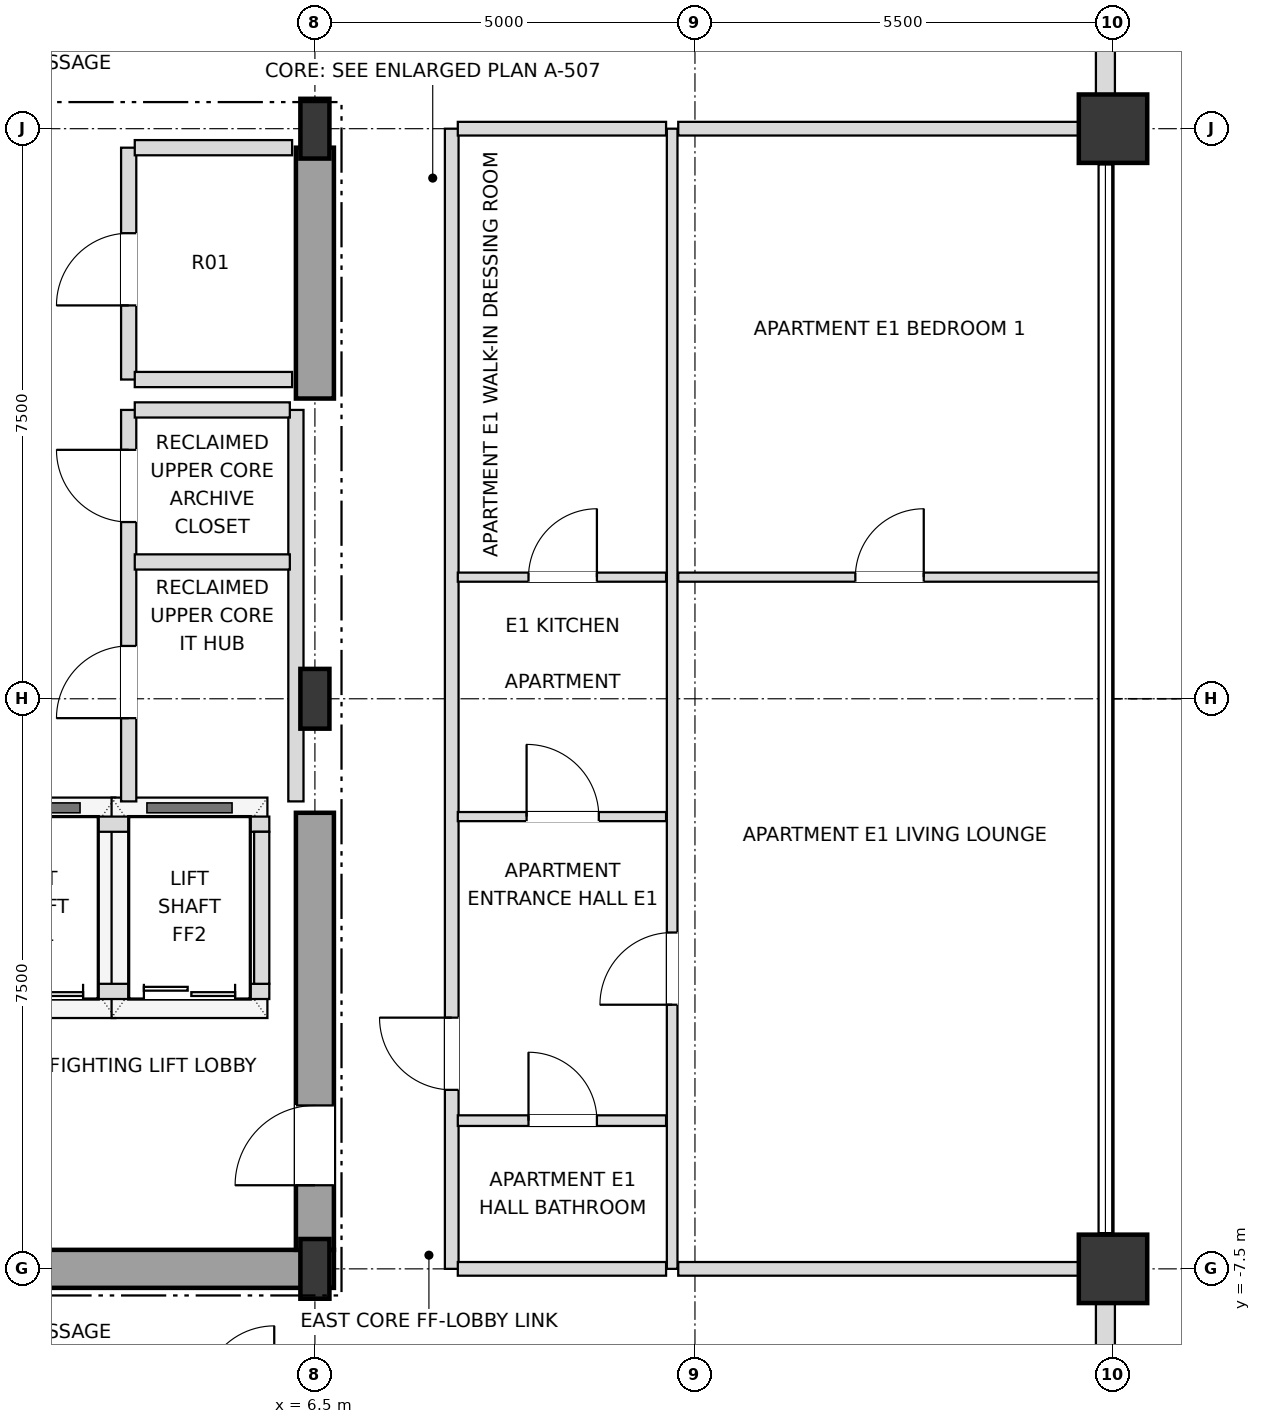
"""IFC4 building model, lengths in metres.
Left out: names, types, materials, properties, quantities, classifications, styles, units other than length and angle.
Written with IfcOpenShell. Run it as: python <this file> out.ifc"""

import sys

from ifc_helpers import new_model, si_unit, direction, frame, frame_2d, origin, origin_2d, place, context, subcontext, project, spatial, rectangle, i_section, extrude, element, fill, save


model = new_model("IFC4")
c1 = context("Model", 3, precision=1e-05, world=origin(), true_north=direction((0.0, 1.0)))
c2 = subcontext(c1, "Body", "Model", "MODEL_VIEW")
j1 = project(units=[si_unit("LENGTHUNIT", "METRE"), si_unit("PLANEANGLEUNIT", "RADIAN")], contexts=[c1])
p1 = place(None, origin())
s1 = spatial("IfcSite", under=j1, at=p1, CompositionType="ELEMENT")
p2 = place(p1, origin())
s2 = spatial("IfcBuilding", under=s1, at=p2, CompositionType="ELEMENT")
p3 = place(p2, frame((0.0, 0.0, 229.5)))
s3 = spatial("IfcBuildingStorey", under=s2, at=p3, CompositionType="ELEMENT", Elevation=229.5)
for number, where, z_axis, x_axis in (
    (1, (6.5, -7.5, 0.0), (0.0, 0.0, 1.0), (1.0, 0.0, 0.0)),
    (2, (6.5, 0.0, 0.0), (0.0, 0.0, 1.0), (1.0, 0.0, 0.0)),
    (3, (6.5, 7.5, 0.0), (0.0, 0.0, 1.0), (1.0, 0.0, 0.0)),
):
    element("IfcColumn", number, at=place(p3, frame(where, z_axis=z_axis, x_axis=x_axis)), inside=s3, PredefinedType="COLUMN", context=c2, shape_type="SweptSolid", body=[
        extrude(i_section(OverallWidth=0.382, OverallDepth=0.786, WebThickness=0.02, FlangeThickness=0.033, at=origin_2d()), origin(), (0.0, 0.0, 1.0), 3.6),
    ])
for number, where, z_axis, x_axis in (
    (4, (17.0, -7.5, 0.0), (0.0, 0.0, 1.0), (1.0, 0.0, 0.0)),
    (5, (17.0, 7.5, 0.0), (0.0, 0.0, 1.0), (1.0, 0.0, 0.0)),
):
    element("IfcColumn", number, at=place(p3, frame(where, z_axis=z_axis, x_axis=x_axis)), inside=s3, PredefinedType="USERDEFINED", context=c2, shape_type="SweptSolid", body=[
        extrude(rectangle(XDim=0.9, YDim=0.9, at=origin_2d()), origin(), (0.0, 0.0, 1.0), 3.6),
    ])
p4 = place(p3, frame((16.9, -12.555, 0.0), z_axis=(0.0, 0.0, 1.0), x_axis=(0.0, 1.0, 0.0)))
e6 = element("IfcWall", 6, at=p4, inside=s3, PredefinedType="SOLIDWALL", context=c2, shape_type="SweptSolid", body=[
    extrude(rectangle(XDim=4.61, YDim=0.25, at=frame_2d((2.305, 0.0))), origin(), (0.0, 0.0, 1.0), 2.748),
])
p5 = place(p4, frame((1.405, 0.0, 0.72)))
e7 = element("IfcOpeningElement", 7, at=p5, cuts=e6, PredefinedType="OPENING", context=c2, shape_type="SweptSolid", body=[
    extrude(rectangle(XDim=1.8, YDim=1.68, at=frame_2d((0.9, 0.84))), frame((0.0, 0.135, 0.0), z_axis=(0.0, -1.0, 0.0), x_axis=(1.0, 0.0, 0.0)), (0.0, 0.0, 1.0), 0.27),
])
p6 = place(p3, frame((16.9, 7.945, 0.0), z_axis=(0.0, 0.0, 1.0), x_axis=(0.0, 1.0, 0.0)))
e8 = element("IfcWall", 8, at=p6, inside=s3, PredefinedType="SOLIDWALL", context=c2, shape_type="SweptSolid", body=[
    extrude(rectangle(XDim=4.61, YDim=0.25, at=frame_2d((2.305, 0.0))), origin(), (0.0, 0.0, 1.0), 2.748),
])
p7 = place(p6, frame((1.405, 0.0, 0.72)))
e9 = element("IfcOpeningElement", 9, at=p7, cuts=e8, PredefinedType="OPENING", context=c2, shape_type="SweptSolid", body=[
    extrude(rectangle(XDim=1.8, YDim=1.68, at=frame_2d((0.9, 0.84))), frame((0.0, 0.135, 0.0), z_axis=(0.0, -1.0, 0.0), x_axis=(1.0, 0.0, 0.0)), (0.0, 0.0, 1.0), 0.27),
])
p8 = place(p3, frame((0.0, -7.5, 0.0), z_axis=(0.0, 0.0, 1.0), x_axis=(1.0, 0.0, 0.0)))
e10 = element("IfcWall", 10, at=p8, inside=s3, PredefinedType="SHEAR", context=c2, shape_type="SweptSolid", body=[
    extrude(rectangle(XDim=6.75, YDim=0.5, at=frame_2d((3.375, 0.0))), origin(), (0.0, 0.0, 1.0), 3.38),
])
p9 = place(p3, frame((6.5, -7.25, 0.0), z_axis=(0.0, 0.0, 1.0), x_axis=(0.0, 1.0, 0.0)))
e11 = element("IfcWall", 11, at=p9, inside=s3, PredefinedType="SHEAR", context=c2, shape_type="SweptSolid", body=[
    extrude(rectangle(XDim=5.75, YDim=0.5, at=frame_2d((2.875, 0.0))), origin(), (0.0, 0.0, 1.0), 3.38),
])
p10 = place(p9, frame((0.85, 0.0, 0.0)))
e12 = element("IfcOpeningElement", 12, at=p10, cuts=e11, PredefinedType="OPENING", context=c2, shape_type="SweptSolid", body=[
    extrude(rectangle(XDim=1.05, YDim=2.15, at=frame_2d((0.525, 1.075))), frame((0.0, 0.26, 0.0), z_axis=(0.0, -1.0, 0.0), x_axis=(1.0, 0.0, 0.0)), (0.0, 0.0, 1.0), 0.52),
])
p11 = place(p3, frame((6.5, 3.95, 0.0), z_axis=(0.0, 0.0, 1.0), x_axis=(0.0, 1.0, 0.0)))
e13 = element("IfcWall", 13, at=p11, inside=s3, PredefinedType="SHEAR", context=c2, shape_type="SweptSolid", body=[
    extrude(rectangle(XDim=3.3, YDim=0.5, at=frame_2d((1.65, 0.0))), origin(), (0.0, 0.0, 1.0), 3.38),
])
p12 = place(p3, frame((1.8, -3.85, 0.0), z_axis=(0.0, 0.0, 1.0), x_axis=(1.0, 0.0, 0.0)))
e14 = element("IfcWall", 14, at=p12, inside=s3, PredefinedType="SOLIDWALL", context=c2, shape_type="SweptSolid", body=[
    extrude(rectangle(XDim=4.1, YDim=0.2, at=frame_2d((2.05, 0.0))), origin(), (0.0, 0.0, 1.0), 3.38),
])
p13 = place(p12, frame((0.45, 0.0, 0.0)))
e15 = element("IfcOpeningElement", 15, at=p13, cuts=e14, PredefinedType="OPENING", context=c2, shape_type="SweptSolid", body=[
    extrude(rectangle(XDim=1.2, YDim=2.2, at=frame_2d((0.6, 1.1))), frame((0.0, 0.11, 0.0), z_axis=(0.0, -1.0, 0.0), x_axis=(1.0, 0.0, 0.0)), (0.0, 0.0, 1.0), 0.22),
])
p14 = place(p12, frame((2.45, 0.0, 0.0)))
e16 = element("IfcOpeningElement", 16, at=p14, cuts=e14, PredefinedType="OPENING", context=c2, shape_type="SweptSolid", body=[
    extrude(rectangle(XDim=1.2, YDim=2.2, at=frame_2d((0.6, 1.1))), frame((0.0, 0.11, 0.0), z_axis=(0.0, -1.0, 0.0), x_axis=(1.0, 0.0, 0.0)), (0.0, 0.0, 1.0), 0.22),
])
p15 = place(p3, frame((1.8, -1.65, 0.0), z_axis=(0.0, 0.0, 1.0), x_axis=(1.0, 0.0, 0.0)))
e17 = element("IfcWall", 17, at=p15, inside=s3, PredefinedType="SOLIDWALL", context=c2, shape_type="SweptSolid", body=[
    extrude(rectangle(XDim=4.1, YDim=0.2, at=frame_2d((2.05, 0.0))), origin(), (0.0, 0.0, 1.0), 3.38),
])
p16 = place(p3, frame((5.8, -3.75, 0.0), z_axis=(0.0, 0.0, 1.0), x_axis=(0.0, 1.0, 0.0)))
e18 = element("IfcWall", 18, at=p16, inside=s3, PredefinedType="SOLIDWALL", context=c2, shape_type="SweptSolid", body=[
    extrude(rectangle(XDim=2.0, YDim=0.2, at=frame_2d((1.0, 0.0))), origin(), (0.0, 0.0, 1.0), 3.38),
])
p17 = place(p3, frame((4.05, -1.35, 0.0), z_axis=(0.0, 0.0, 1.0), x_axis=(0.0, 1.0, 0.0)))
e19 = element("IfcWall", 19, at=p17, inside=s3, PredefinedType="SOLIDWALL", context=c2, shape_type="SweptSolid", body=[
    extrude(rectangle(XDim=5.15, YDim=0.2, at=frame_2d((2.575, 0.0))), origin(), (0.0, 0.0, 1.0), 3.38),
])
p18 = place(p17, frame((1.095, 0.0, 0.0)))
e20 = element("IfcOpeningElement", 20, at=p18, cuts=e19, PredefinedType="OPENING", context=c2, shape_type="SweptSolid", body=[
    extrude(rectangle(XDim=0.95, YDim=2.15, at=frame_2d((0.475, 1.075))), frame((0.0, 0.11, 0.0), z_axis=(0.0, -1.0, 0.0), x_axis=(1.0, 0.0, 0.0)), (0.0, 0.0, 1.0), 0.22),
])
p19 = place(p17, frame((3.675, 0.0, 0.0)))
e21 = element("IfcOpeningElement", 21, at=p19, cuts=e19, PredefinedType="OPENING", context=c2, shape_type="SweptSolid", body=[
    extrude(rectangle(XDim=0.95, YDim=2.15, at=frame_2d((0.475, 1.075))), frame((0.0, 0.11, 0.0), z_axis=(0.0, -1.0, 0.0), x_axis=(1.0, 0.0, 0.0)), (0.0, 0.0, 1.0), 0.22),
])
p20 = place(p3, frame((4.05, 4.2, 0.0), z_axis=(0.0, 0.0, 1.0), x_axis=(0.0, 1.0, 0.0)))
e22 = element("IfcWall", 22, at=p20, inside=s3, PredefinedType="SOLIDWALL", context=c2, shape_type="SweptSolid", body=[
    extrude(rectangle(XDim=3.05, YDim=0.2, at=frame_2d((1.525, 0.0))), origin(), (0.0, 0.0, 1.0), 3.38),
])
p21 = place(p20, frame((0.975, 0.0, 0.0)))
e23 = element("IfcOpeningElement", 23, at=p21, cuts=e22, PredefinedType="OPENING", context=c2, shape_type="SweptSolid", body=[
    extrude(rectangle(XDim=0.95, YDim=2.15, at=frame_2d((0.475, 1.075))), frame((0.0, 0.11, 0.0), z_axis=(0.0, -1.0, 0.0), x_axis=(1.0, 0.0, 0.0)), (0.0, 0.0, 1.0), 0.22),
])
p22 = place(p3, frame((6.25, -1.35, 0.0), z_axis=(0.0, 0.0, 1.0), x_axis=(0.0, 1.0, 0.0)))
e24 = element("IfcWall", 24, at=p22, inside=s3, PredefinedType="SOLIDWALL", context=c2, shape_type="SweptSolid", body=[
    extrude(rectangle(XDim=5.15, YDim=0.2, at=frame_2d((2.575, 0.0))), origin(), (0.0, 0.0, 1.0), 3.38),
])
p23 = place(p3, frame((8.3, -7.5, 0.0), z_axis=(0.0, 0.0, 1.0), x_axis=(0.0, 1.0, 0.0)))
e25 = element("IfcWall", 25, at=p23, inside=s3, PredefinedType="PARTITIONING", context=c2, shape_type="SweptSolid", body=[
    extrude(rectangle(XDim=15.0, YDim=0.18, at=frame_2d((7.5, 0.0))), origin(), (0.0, 0.0, 1.0), 3.38),
])
p24 = place(p23, frame((2.355, 0.0, 0.0)))
e26 = element("IfcOpeningElement", 26, at=p24, cuts=e25, PredefinedType="OPENING", context=c2, shape_type="SweptSolid", body=[
    extrude(rectangle(XDim=0.95, YDim=2.15, at=frame_2d((0.475, 1.075))), frame((0.0, 0.1, 0.0), z_axis=(0.0, -1.0, 0.0), x_axis=(1.0, 0.0, 0.0)), (0.0, 0.0, 1.0), 0.2),
])
p25 = place(p3, frame((11.2, -7.5, 0.0), z_axis=(0.0, 0.0, 1.0), x_axis=(0.0, 1.0, 0.0)))
e27 = element("IfcWall", 27, at=p25, inside=s3, PredefinedType="PARTITIONING", context=c2, shape_type="SweptSolid", body=[
    extrude(rectangle(XDim=15.0, YDim=0.14, at=frame_2d((7.5, 0.0))), origin(), (0.0, 0.0, 1.0), 3.38),
])
p26 = place(p25, frame((3.475, 0.0, 0.0)))
e28 = element("IfcOpeningElement", 28, at=p26, cuts=e27, PredefinedType="OPENING", context=c2, shape_type="SweptSolid", body=[
    extrude(rectangle(XDim=0.95, YDim=2.1, at=frame_2d((0.475, 1.05))), frame((0.0, 0.08, 0.0), z_axis=(0.0, -1.0, 0.0), x_axis=(1.0, 0.0, 0.0)), (0.0, 0.0, 1.0), 0.16),
])
p27 = place(p3, frame((8.38, -7.5, 0.0), z_axis=(0.0, 0.0, 1.0), x_axis=(1.0, 0.0, 0.0)))
e29 = element("IfcWall", 29, at=p27, inside=s3, PredefinedType="PARTITIONING", context=c2, shape_type="SweptSolid", body=[
    extrude(rectangle(XDim=2.74, YDim=0.18, at=frame_2d((1.37, 0.0))), origin(), (0.0, 0.0, 1.0), 2.826),
])
p28 = place(p3, frame((11.28, -7.5, 0.0), z_axis=(0.0, 0.0, 1.0), x_axis=(1.0, 0.0, 0.0)))
e30 = element("IfcWall", 30, at=p28, inside=s3, PredefinedType="PARTITIONING", context=c2, shape_type="SweptSolid", body=[
    extrude(rectangle(XDim=5.62, YDim=0.18, at=frame_2d((2.81, 0.0))), origin(), (0.0, 0.0, 1.0), 2.826),
])
p29 = place(p3, frame((8.38, -5.55, 0.0), z_axis=(0.0, 0.0, 1.0), x_axis=(1.0, 0.0, 0.0)))
e31 = element("IfcWall", 31, at=p29, inside=s3, PredefinedType="PARTITIONING", context=c2, shape_type="SweptSolid", body=[
    extrude(rectangle(XDim=2.74, YDim=0.14, at=frame_2d((1.37, 0.0))), origin(), (0.0, 0.0, 1.0), 3.38),
])
p30 = place(p29, frame((0.93, 0.0, 0.0)))
e32 = element("IfcOpeningElement", 32, at=p30, cuts=e31, PredefinedType="OPENING", context=c2, shape_type="SweptSolid", body=[
    extrude(rectangle(XDim=0.9, YDim=2.1, at=frame_2d((0.45, 1.05))), frame((0.0, 0.08, 0.0), z_axis=(0.0, -1.0, 0.0), x_axis=(1.0, 0.0, 0.0)), (0.0, 0.0, 1.0), 0.16),
])
p31 = place(p3, frame((8.38, -1.55, 0.0), z_axis=(0.0, 0.0, 1.0), x_axis=(1.0, 0.0, 0.0)))
e33 = element("IfcWall", 33, at=p31, inside=s3, PredefinedType="PARTITIONING", context=c2, shape_type="SweptSolid", body=[
    extrude(rectangle(XDim=2.74, YDim=0.12, at=frame_2d((1.37, 0.0))), origin(), (0.0, 0.0, 1.0), 3.38),
])
p32 = place(p31, frame((0.905, 0.0, 0.0)))
e34 = element("IfcOpeningElement", 34, at=p32, cuts=e33, PredefinedType="OPENING", context=c2, shape_type="SweptSolid", body=[
    extrude(rectangle(XDim=0.95, YDim=2.1, at=frame_2d((0.475, 1.05))), frame((0.0, 0.07, 0.0), z_axis=(0.0, -1.0, 0.0), x_axis=(1.0, 0.0, 0.0)), (0.0, 0.0, 1.0), 0.14),
])
p33 = place(p3, frame((8.38, 1.6, 0.0), z_axis=(0.0, 0.0, 1.0), x_axis=(1.0, 0.0, 0.0)))
e35 = element("IfcWall", 35, at=p33, inside=s3, PredefinedType="PARTITIONING", context=c2, shape_type="SweptSolid", body=[
    extrude(rectangle(XDim=2.74, YDim=0.12, at=frame_2d((1.37, 0.0))), origin(), (0.0, 0.0, 1.0), 3.38),
])
p34 = place(p33, frame((0.93, 0.0, 0.0)))
e36 = element("IfcOpeningElement", 36, at=p34, cuts=e35, PredefinedType="OPENING", context=c2, shape_type="SweptSolid", body=[
    extrude(rectangle(XDim=0.9, YDim=2.1, at=frame_2d((0.45, 1.05))), frame((0.0, 0.07, 0.0), z_axis=(0.0, -1.0, 0.0), x_axis=(1.0, 0.0, 0.0)), (0.0, 0.0, 1.0), 0.14),
])
p35 = place(p3, frame((11.28, 1.6, 0.0), z_axis=(0.0, 0.0, 1.0), x_axis=(1.0, 0.0, 0.0)))
e37 = element("IfcWall", 37, at=p35, inside=s3, PredefinedType="PARTITIONING", context=c2, shape_type="SweptSolid", body=[
    extrude(rectangle(XDim=5.54, YDim=0.12, at=frame_2d((2.77, 0.0))), origin(), (0.0, 0.0, 1.0), 3.018),
])
p36 = place(p35, frame((2.33, 0.0, 0.0)))
e38 = element("IfcOpeningElement", 38, at=p36, cuts=e37, PredefinedType="OPENING", context=c2, shape_type="SweptSolid", body=[
    extrude(rectangle(XDim=0.9, YDim=2.1, at=frame_2d((0.45, 1.05))), frame((0.0, 0.07, 0.0), z_axis=(0.0, -1.0, 0.0), x_axis=(1.0, 0.0, 0.0)), (0.0, 0.0, 1.0), 0.14),
])
for number, where, z_axis, x_axis in (
    (39, (4.13, 1.8, 0.0), (0.0, 0.0, 1.0), (1.0, 0.0, 0.0)),
    (40, (4.13, 3.8, 0.0), (0.0, 0.0, 1.0), (1.0, 0.0, 0.0)),
):
    element("IfcWall", number, at=place(p3, frame(where, z_axis=z_axis, x_axis=x_axis)), inside=s3, PredefinedType="SOLIDWALL", context=c2, shape_type="SweptSolid", body=[
        extrude(rectangle(XDim=2.04, YDim=0.2, at=frame_2d((1.02, 0.0))), origin(), (0.0, 0.0, 1.0), 3.38),
    ])
for number, where, z_axis, x_axis in (
    (41, (4.13, 4.2, 0.0), (0.0, 0.0, 1.0), (1.0, 0.0, 0.0)),
    (42, (4.13, 7.25, 0.0), (0.0, 0.0, 1.0), (1.0, 0.0, 0.0)),
):
    element("IfcWall", number, at=place(p3, frame(where, z_axis=z_axis, x_axis=x_axis)), inside=s3, PredefinedType="SOLIDWALL", context=c2, shape_type="SweptSolid", body=[
        extrude(rectangle(XDim=2.07, YDim=0.2, at=frame_2d((1.035, 0.0))), origin(), (0.0, 0.0, 1.0), 3.38),
    ])
p37 = place(p3, frame((8.38, 7.5, 0.0), z_axis=(0.0, 0.0, 1.0), x_axis=(1.0, 0.0, 0.0)))
e43 = element("IfcWall", 43, at=p37, inside=s3, PredefinedType="PARTITIONING", context=c2, shape_type="SweptSolid", body=[
    extrude(rectangle(XDim=2.74, YDim=0.18, at=frame_2d((1.37, 0.0))), origin(), (0.0, 0.0, 1.0), 2.826),
])
p38 = place(p3, frame((11.28, 7.5, 0.0), z_axis=(0.0, 0.0, 1.0), x_axis=(1.0, 0.0, 0.0)))
e44 = element("IfcWall", 44, at=p38, inside=s3, PredefinedType="PARTITIONING", context=c2, shape_type="SweptSolid", body=[
    extrude(rectangle(XDim=5.62, YDim=0.18, at=frame_2d((2.81, 0.0))), origin(), (0.0, 0.0, 1.0), 2.826),
])
p39 = place(p10, origin())
e45 = element("IfcDoor", 45, at=p39, inside=s3, OperationType="SINGLE_SWING_LEFT", PredefinedType="DOOR", context=c2, shape_type="SweptSolid", body=[
    extrude(rectangle(XDim=1.05, YDim=2.15, at=frame_2d((0.525, 1.075))), frame((0.0, 0.025, 0.0), z_axis=(0.0, -1.0, 0.0), x_axis=(1.0, 0.0, 0.0)), (0.0, 0.0, 1.0), 0.05),
])
fill(e12, e45)
p40 = place(p13, origin())
e46 = element("IfcDoor", 46, at=p40, inside=s3, OperationType="DOUBLE_DOOR_SLIDING", PredefinedType="DOOR", context=c2, shape_type="SweptSolid", body=[
    extrude(rectangle(XDim=1.2, YDim=2.2, at=frame_2d((0.6, 1.1))), frame((0.0, 0.025, 0.0), z_axis=(0.0, -1.0, 0.0), x_axis=(1.0, 0.0, 0.0)), (0.0, 0.0, 1.0), 0.05),
])
fill(e15, e46)
p41 = place(p14, origin())
e47 = element("IfcDoor", 47, at=p41, inside=s3, OperationType="DOUBLE_DOOR_SLIDING", PredefinedType="DOOR", context=c2, shape_type="SweptSolid", body=[
    extrude(rectangle(XDim=1.2, YDim=2.2, at=frame_2d((0.6, 1.1))), frame((0.0, 0.025, 0.0), z_axis=(0.0, -1.0, 0.0), x_axis=(1.0, 0.0, 0.0)), (0.0, 0.0, 1.0), 0.05),
])
fill(e16, e47)
p42 = place(p18, origin())
e48 = element("IfcDoor", 48, at=p42, inside=s3, OperationType="SINGLE_SWING_LEFT", PredefinedType="DOOR", context=c2, shape_type="SweptSolid", body=[
    extrude(rectangle(XDim=0.95, YDim=2.15, at=frame_2d((0.475, 1.075))), frame((0.0, 0.025, 0.0), z_axis=(0.0, -1.0, 0.0), x_axis=(1.0, 0.0, 0.0)), (0.0, 0.0, 1.0), 0.05),
])
fill(e20, e48)
p43 = place(p19, origin())
e49 = element("IfcDoor", 49, at=p43, inside=s3, OperationType="SINGLE_SWING_RIGHT", PredefinedType="DOOR", context=c2, shape_type="SweptSolid", body=[
    extrude(rectangle(XDim=0.95, YDim=2.15, at=frame_2d((0.475, 1.075))), frame((0.0, 0.025, 0.0), z_axis=(0.0, -1.0, 0.0), x_axis=(1.0, 0.0, 0.0)), (0.0, 0.0, 1.0), 0.05),
])
fill(e21, e49)
p44 = place(p21, origin())
e50 = element("IfcDoor", 50, at=p44, inside=s3, OperationType="SINGLE_SWING_LEFT", PredefinedType="DOOR", context=c2, shape_type="SweptSolid", body=[
    extrude(rectangle(XDim=0.95, YDim=2.15, at=frame_2d((0.475, 1.075))), frame((0.0, 0.025, 0.0), z_axis=(0.0, -1.0, 0.0), x_axis=(1.0, 0.0, 0.0)), (0.0, 0.0, 1.0), 0.05),
])
fill(e23, e50)
p45 = place(p30, origin())
e51 = element("IfcDoor", 51, at=p45, inside=s3, OperationType="SINGLE_SWING_LEFT", PredefinedType="DOOR", context=c2, shape_type="SweptSolid", body=[
    extrude(rectangle(XDim=0.9, YDim=2.1, at=frame_2d((0.45, 1.05))), frame((0.0, 0.025, 0.0), z_axis=(0.0, -1.0, 0.0), x_axis=(1.0, 0.0, 0.0)), (0.0, 0.0, 1.0), 0.05),
])
fill(e32, e51)
p46 = place(p24, origin())
e52 = element("IfcDoor", 52, at=p46, inside=s3, OperationType="SINGLE_SWING_RIGHT", PredefinedType="DOOR", context=c2, shape_type="SweptSolid", body=[
    extrude(rectangle(XDim=0.95, YDim=2.15, at=frame_2d((0.475, 1.075))), frame((0.0, 0.025, 0.0), z_axis=(0.0, -1.0, 0.0), x_axis=(1.0, 0.0, 0.0)), (0.0, 0.0, 1.0), 0.05),
])
fill(e26, e52)
p47 = place(p32, origin())
e53 = element("IfcDoor", 53, at=p47, inside=s3, OperationType="SINGLE_SWING_LEFT", PredefinedType="DOOR", context=c2, shape_type="SweptSolid", body=[
    extrude(rectangle(XDim=0.95, YDim=2.1, at=frame_2d((0.475, 1.05))), frame((0.0, 0.025, 0.0), z_axis=(0.0, -1.0, 0.0), x_axis=(1.0, 0.0, 0.0)), (0.0, 0.0, 1.0), 0.05),
])
fill(e34, e53)
p48 = place(p34, origin())
e54 = element("IfcDoor", 54, at=p48, inside=s3, OperationType="SINGLE_SWING_RIGHT", PredefinedType="DOOR", context=c2, shape_type="SweptSolid", body=[
    extrude(rectangle(XDim=0.9, YDim=2.1, at=frame_2d((0.45, 1.05))), frame((0.0, 0.025, 0.0), z_axis=(0.0, -1.0, 0.0), x_axis=(1.0, 0.0, 0.0)), (0.0, 0.0, 1.0), 0.05),
])
fill(e36, e54)
p49 = place(p26, origin())
e55 = element("IfcDoor", 55, at=p49, inside=s3, OperationType="SINGLE_SWING_LEFT", PredefinedType="DOOR", context=c2, shape_type="SweptSolid", body=[
    extrude(rectangle(XDim=0.95, YDim=2.1, at=frame_2d((0.475, 1.05))), frame((0.0, 0.025, 0.0), z_axis=(0.0, -1.0, 0.0), x_axis=(1.0, 0.0, 0.0)), (0.0, 0.0, 1.0), 0.05),
])
fill(e28, e55)
p50 = place(p36, origin())
e56 = element("IfcDoor", 56, at=p50, inside=s3, OperationType="SINGLE_SWING_RIGHT", PredefinedType="DOOR", context=c2, shape_type="SweptSolid", body=[
    extrude(rectangle(XDim=0.9, YDim=2.1, at=frame_2d((0.45, 1.05))), frame((0.0, 0.025, 0.0), z_axis=(0.0, -1.0, 0.0), x_axis=(1.0, 0.0, 0.0)), (0.0, 0.0, 1.0), 0.05),
])
fill(e38, e56)
save(model, sys.argv[1])
